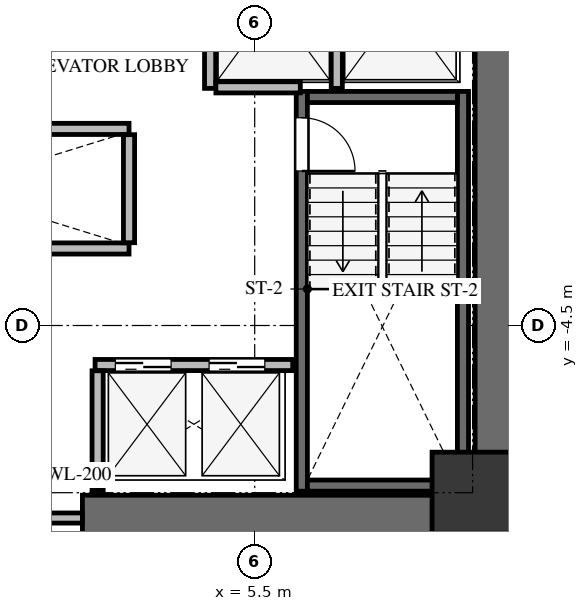
"""IFC4 building model, lengths in metres.
Left out: names, types, materials, properties, quantities, classifications, styles, units other than length and angle.
Written with IfcOpenShell. Run it as: python <this file> out.ifc"""

import sys

from ifc_helpers import new_model, si_unit, direction, frame, frame_2d, origin, origin_2d, place, context, subcontext, project, spatial, rectangle, extrude, source, transform, mapped, element, fill, save


model = new_model("IFC4")
c1 = context("Model", 3, precision=1e-05, world=origin(), true_north=direction((0.0, 1.0)))
c2 = subcontext(c1, "Body", "Model", "MODEL_VIEW")
j1 = project(units=[si_unit("LENGTHUNIT", "METRE"), si_unit("PLANEANGLEUNIT", "RADIAN")], contexts=[c1])
p1 = place(None, origin())
s1 = spatial("IfcSite", under=j1, at=p1, CompositionType="ELEMENT")
p2 = place(p1, origin())
s2 = spatial("IfcBuilding", under=s1, at=p2, CompositionType="ELEMENT")
p3 = place(p2, frame((0.0, 0.0, 75.3)))
s3 = spatial("IfcBuildingStorey", under=s2, at=p3, CompositionType="ELEMENT", Elevation=75.3)
p4 = place(p3, frame((10.3, -8.75, 0.0), z_axis=(0.0, 0.0, 1.0), x_axis=(0.0, 1.0, 0.0)))
e1 = element("IfcWall", 1, at=p4, inside=s3, PredefinedType="SHEAR", context=c2, shape_type="SweptSolid", body=[
    extrude(rectangle(XDim=17.5, YDim=0.9, at=frame_2d((8.75, 0.0))), origin(), (0.0, 0.0, 1.0), 3.0),
])
p5 = place(p3, frame((2.1, -8.3, 0.0), z_axis=(0.0, 0.0, 1.0), x_axis=(1.0, 0.0, 0.0)))
e2 = element("IfcWall", 2, at=p5, inside=s3, PredefinedType="SHEAR", context=c2, shape_type="SweptSolid", body=[
    extrude(rectangle(XDim=7.75, YDim=0.9, at=frame_2d((3.875, 0.0))), origin(), (0.0, 0.0, 1.0), 3.0),
])
p6 = place(p3, frame((9.61, -7.77, -0.24), z_axis=(0.0, 0.0, 1.0), x_axis=(0.0, 1.0, 0.0)))
e3 = element("IfcWall", 3, at=p6, inside=s3, PredefinedType="SHEAR", context=c2, shape_type="SweptSolid", body=[
    extrude(rectangle(XDim=7.89, YDim=0.22, at=frame_2d((3.945, 0.0))), origin(), (0.0, 0.0, 1.0), 3.0),
])
p7 = place(p3, frame((6.43, 0.12, -0.24), z_axis=(0.0, 0.0, 1.0), x_axis=(0.0, -1.0, 0.0)))
e4 = element("IfcWall", 4, at=p7, inside=s3, PredefinedType="SHEAR", context=c2, shape_type="SweptSolid", body=[
    extrude(rectangle(XDim=7.89, YDim=0.22, at=frame_2d((3.945, 0.0))), origin(), (0.0, 0.0, 1.0), 3.0),
])
p8 = place(p7, frame((0.52, 0.0, 0.0)))
e5 = element("IfcOpeningElement", 5, at=p8, cuts=e4, PredefinedType="OPENING", context=c2, shape_type="SweptSolid", body=[
    extrude(rectangle(XDim=1.05, YDim=2.15, at=frame_2d((0.525, 1.075))), frame((0.0, 0.12, 0.0), z_axis=(0.0, -1.0, 0.0), x_axis=(1.0, 0.0, 0.0)), (0.0, 0.0, 1.0), 0.24),
])
for number, where, z_axis, x_axis in (
    (6, (6.54, -7.66, -0.24), (0.0, 0.0, 1.0), (1.0, 0.0, 0.0)),
    (7, (9.5, 0.01, -0.24), (0.0, 0.0, 1.0), (-1.0, 0.0, 0.0)),
):
    element("IfcWall", number, at=place(p3, frame(where, z_axis=z_axis, x_axis=x_axis)), inside=s3, PredefinedType="SHEAR", context=c2, shape_type="SweptSolid", body=[
        extrude(rectangle(XDim=2.96, YDim=0.22, at=frame_2d((1.48, 0.0))), origin(), (0.0, 0.0, 1.0), 3.0),
    ])
m1 = source(origin(), c2, "Body", "SweptSolid", [
    extrude(rectangle(XDim=1.6, YDim=1.6, at=origin_2d()), origin(), (0.0, 0.0, 1.0), 3.0),
])
p9 = place(p3, frame((9.8, -7.8, -0.24), z_axis=(0.0, 0.0, 1.0), x_axis=(1.0, 0.0, 0.0)))
e8 = element("IfcColumn", 8, at=p9, inside=s3, PredefinedType="COLUMN", context=c2, shape_type="MappedRepresentation", body=[
    mapped(m1, transform((0.0, 0.0, 0.0), x_axis=(1.0, 0.0, 0.0), y_axis=(0.0, 1.0, 0.0), z_axis=(0.0, 0.0, 1.0), scale=1.0)),
])
p10 = place(p3, frame((-2.1, -8.3, 0.0), z_axis=(0.0, 0.0, 1.0), x_axis=(1.0, 0.0, 0.0)))
e9 = element("IfcWall", 9, at=p10, inside=s3, PredefinedType="SOLIDWALL", context=c2, shape_type="SweptSolid", body=[
    extrude(rectangle(XDim=4.2, YDim=0.2, at=frame_2d((2.1, 0.0))), origin(), (0.0, 0.0, 1.0), 2.745),
])
p11 = place(p10, frame((1.2, 0.0, 0.0)))
e10 = element("IfcOpeningElement", 10, at=p11, cuts=e9, PredefinedType="OPENING", context=c2, shape_type="SweptSolid", body=[
    extrude(rectangle(XDim=1.8, YDim=2.15, at=frame_2d((0.9, 1.075))), frame((0.0, 0.11, 0.0), z_axis=(0.0, -1.0, 0.0), x_axis=(1.0, 0.0, 0.0)), (0.0, 0.0, 1.0), 0.22),
])
for number, where, z_axis, x_axis in (
    (11, (4.62, 0.18, 0.0), (0.0, 0.0, 1.0), (0.0, 1.0, 0.0)),
    (12, (7.12, 0.18, 0.0), (0.0, 0.0, 1.0), (0.0, 1.0, 0.0)),
):
    element("IfcWall", number, at=place(p3, frame(where, z_axis=z_axis, x_axis=x_axis)), inside=s3, PredefinedType="SOLIDWALL", context=c2, shape_type="SweptSolid", body=[
        extrude(rectangle(XDim=3.186, YDim=0.22, at=frame_2d((1.593, 0.0))), origin(), (0.0, 0.0, 1.0), 2.745),
    ])
p12 = place(p3, frame((4.734, 0.2, 0.0), z_axis=(0.0, 0.0, 1.0), x_axis=(1.0, 0.0, 0.0)))
e13 = element("IfcWall", 13, at=p12, inside=s3, PredefinedType="SOLIDWALL", context=c2, shape_type="SweptSolid", body=[
    extrude(rectangle(XDim=1.666, YDim=0.22, at=frame_2d((0.833, 0.0))), origin(), (0.0, 0.0, 1.0), 2.745),
])
p13 = place(p3, frame((2.35, -5.28, 0.0), z_axis=(0.0, 0.0, 1.0), x_axis=(1.0, 0.0, 0.0)))
e14 = element("IfcWall", 14, at=p13, inside=s3, PredefinedType="SOLIDWALL", context=c2, shape_type="SweptSolid", body=[
    extrude(rectangle(XDim=3.9, YDim=0.22, at=frame_2d((1.95, 0.0))), origin(), (0.0, 0.0, 1.0), 2.745),
])
p14 = place(p13, frame((0.4, 0.0, 0.0)))
e15 = element("IfcOpeningElement", 15, at=p14, cuts=e14, PredefinedType="OPENING", context=c2, shape_type="SweptSolid", body=[
    extrude(rectangle(XDim=1.1, YDim=2.15, at=frame_2d((0.55, 1.075))), frame((0.0, 0.12, 0.0), z_axis=(0.0, -1.0, 0.0), x_axis=(1.0, 0.0, 0.0)), (0.0, 0.0, 1.0), 0.24),
])
p15 = place(p13, frame((2.25, 0.0, 0.0)))
e16 = element("IfcOpeningElement", 16, at=p15, cuts=e14, PredefinedType="OPENING", context=c2, shape_type="SweptSolid", body=[
    extrude(rectangle(XDim=1.1, YDim=2.15, at=frame_2d((0.55, 1.075))), frame((0.0, 0.12, 0.0), z_axis=(0.0, -1.0, 0.0), x_axis=(1.0, 0.0, 0.0)), (0.0, 0.0, 1.0), 0.24),
])
p16 = place(p3, frame((2.4, -7.75, 0.0), z_axis=(0.0, 0.0, 1.0), x_axis=(0.0, 1.0, 0.0)))
e17 = element("IfcWall", 17, at=p16, inside=s3, PredefinedType="SOLIDWALL", context=c2, shape_type="SweptSolid", body=[
    extrude(rectangle(XDim=2.356, YDim=0.22, at=frame_2d((1.178, 0.0))), origin(), (0.0, 0.0, 1.0), 2.745),
])
for number, where, z_axis, x_axis in (
    (18, (-4.22, -2.98, 0.0), (0.0, 0.0, 1.0), (1.0, 0.0, 0.0)),
    (19, (-4.22, -0.62, 0.0), (0.0, 0.0, 1.0), (1.0, 0.0, 0.0)),
):
    element("IfcWall", number, at=place(p3, frame(where, z_axis=z_axis, x_axis=x_axis)), inside=s3, PredefinedType="SOLIDWALL", context=c2, shape_type="SweptSolid", body=[
        extrude(rectangle(XDim=7.24, YDim=0.22, at=frame_2d((3.62, 0.0))), origin(), (0.0, 0.0, 1.0), 2.745),
    ])
p17 = place(p3, frame((3.02, -2.866, 0.0), z_axis=(0.0, 0.0, 1.0), x_axis=(0.0, 1.0, 0.0)))
e20 = element("IfcWall", 20, at=p17, inside=s3, PredefinedType="SOLIDWALL", context=c2, shape_type="SweptSolid", body=[
    extrude(rectangle(XDim=2.132, YDim=0.22, at=frame_2d((1.066, 0.0))), origin(), (0.0, 0.0, 1.0), 2.745),
])
m2 = source(origin(), c2, "Body", "SweptSolid", [
    extrude(rectangle(XDim=1.05, YDim=2.15, at=frame_2d((0.525, 1.075))), frame((0.0, 0.025, 0.0), z_axis=(0.0, -1.0, 0.0), x_axis=(1.0, 0.0, 0.0)), (0.0, 0.0, 1.0), 0.05),
])
p18 = place(p8, origin())
e21 = element("IfcDoor", 21, at=p18, inside=s3, OperationType="SINGLE_SWING_RIGHT", PredefinedType="DOOR", context=c2, shape_type="MappedRepresentation", body=[
    mapped(m2, transform((0.0, 0.0, 0.0), x_axis=(1.0, 0.0, 0.0), y_axis=(0.0, 1.0, 0.0), z_axis=(0.0, 0.0, 1.0), scale=1.0)),
])
fill(e5, e21)
m3 = source(origin(), c2, "Body", "SweptSolid", [
    extrude(rectangle(XDim=1.1, YDim=2.15, at=frame_2d((0.55, 1.075))), frame((0.0, 0.025, 0.0), z_axis=(0.0, -1.0, 0.0), x_axis=(1.0, 0.0, 0.0)), (0.0, 0.0, 1.0), 0.05),
])
p19 = place(p14, origin())
e22 = element("IfcDoor", 22, at=p19, inside=s3, OperationType="DOUBLE_DOOR_SLIDING", PredefinedType="DOOR", context=c2, shape_type="MappedRepresentation", body=[
    mapped(m3, transform((0.0, 0.0, 0.0), x_axis=(1.0, 0.0, 0.0), y_axis=(0.0, 1.0, 0.0), z_axis=(0.0, 0.0, 1.0), scale=1.0)),
])
fill(e15, e22)
p20 = place(p15, origin())
e23 = element("IfcDoor", 23, at=p20, inside=s3, OperationType="DOUBLE_DOOR_SLIDING", PredefinedType="DOOR", context=c2, shape_type="MappedRepresentation", body=[
    mapped(m3, transform((0.0, 0.0, 0.0), x_axis=(1.0, 0.0, 0.0), y_axis=(0.0, 1.0, 0.0), z_axis=(0.0, 0.0, 1.0), scale=1.0)),
])
fill(e16, e23)
save(model, sys.argv[1])
